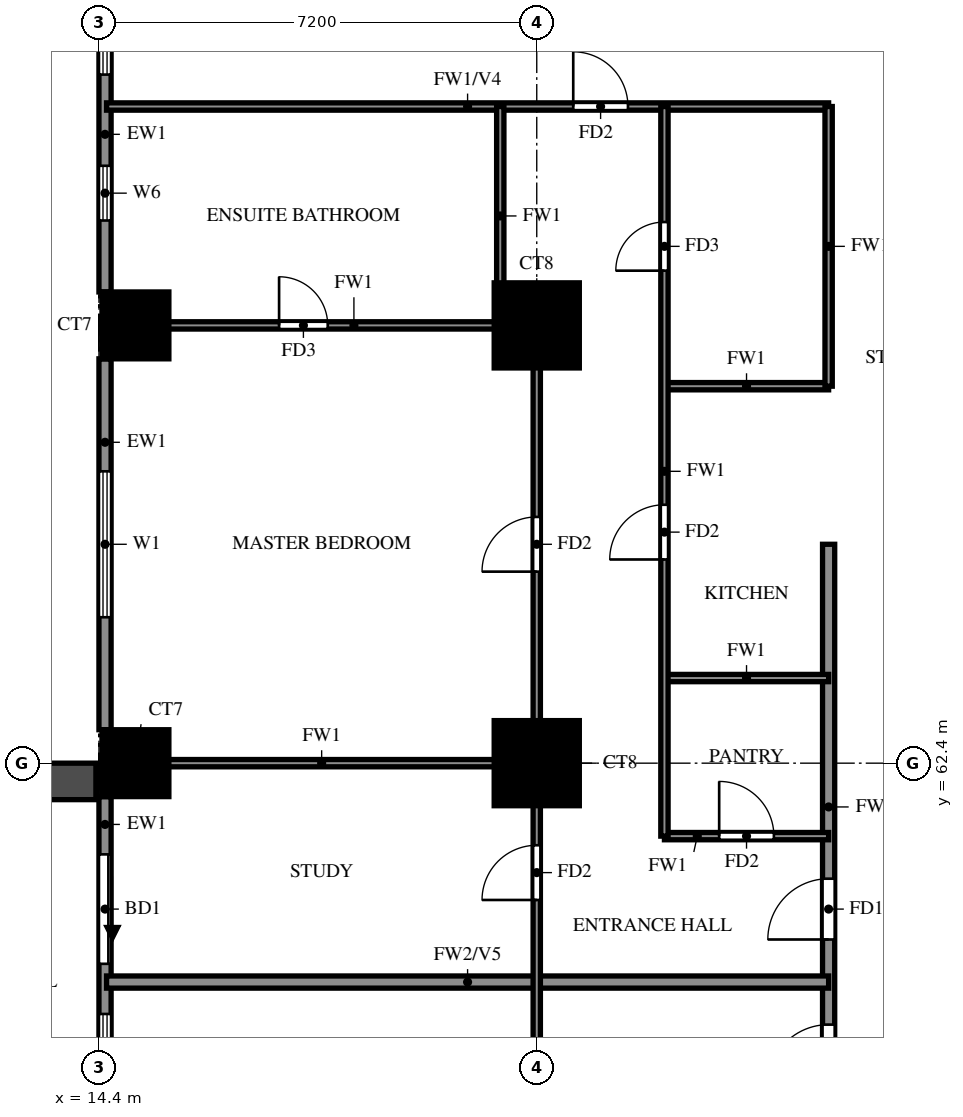
"""IFC4 building model, lengths in metres.
Left out: names, types, materials, properties, quantities, classifications, styles, units other than length and angle.
Written with IfcOpenShell. Run it as: python <this file> out.ifc"""

import sys

from ifc_helpers import new_model, si_unit, direction, frame, frame_2d, origin, origin_2d, place, context, subcontext, project, spatial, rectangle, extrude, source, transform, mapped, element, fill, save


model = new_model("IFC4")
c1 = context("Model", 3, precision=1e-05, world=origin(), true_north=direction((0.0, 1.0)))
c2 = subcontext(c1, "Body", "Model", "MODEL_VIEW")
j1 = project(units=[si_unit("LENGTHUNIT", "METRE"), si_unit("PLANEANGLEUNIT", "RADIAN")], contexts=[c1])
p1 = place(None, origin())
s1 = spatial("IfcSite", under=j1, at=p1, CompositionType="ELEMENT")
p2 = place(p1, origin())
s2 = spatial("IfcBuilding", under=s1, at=p2, CompositionType="ELEMENT")
p3 = place(p2, frame((0.0, 0.0, 48.0)))
s3 = spatial("IfcBuildingStorey", under=s2, at=p3, CompositionType="ELEMENT", Elevation=48.0)
m1 = source(origin(), c2, "Body", "SweptSolid", [
    extrude(rectangle(XDim=1.1, YDim=1.1, at=origin_2d()), origin(), (0.0, 0.0, 1.0), 3.18),
])
p4 = place(p3, frame((15.0, 62.4, 0.0), z_axis=(0.0, 0.0, 1.0), x_axis=(1.0, 0.0, 0.0)))
e1 = element("IfcColumn", 1, at=p4, inside=s3, PredefinedType="COLUMN", context=c2, shape_type="MappedRepresentation", body=[
    mapped(m1, transform((0.0, 0.0, 0.0))),
])
m2 = source(origin(), c2, "Body", "SweptSolid", [
    extrude(rectangle(XDim=1.4, YDim=1.4, at=origin_2d()), origin(), (0.0, 0.0, 1.0), 3.18),
])
p5 = place(p3, frame((21.6, 62.4, 0.0), z_axis=(0.0, 0.0, 1.0), x_axis=(1.0, 0.0, 0.0)))
e2 = element("IfcColumn", 2, at=p5, inside=s3, PredefinedType="COLUMN", context=c2, shape_type="MappedRepresentation", body=[
    mapped(m2, transform((0.0, 0.0, 0.0))),
])
p6 = place(p3, frame((15.0, 69.6, 0.0), z_axis=(0.0, 0.0, 1.0), x_axis=(1.0, 0.0, 0.0)))
e3 = element("IfcColumn", 3, at=p6, inside=s3, PredefinedType="COLUMN", context=c2, shape_type="MappedRepresentation", body=[
    mapped(m1, transform((0.0, 0.0, 0.0))),
])
p7 = place(p3, frame((21.6, 69.6, 0.0), z_axis=(0.0, 0.0, 1.0), x_axis=(1.0, 0.0, 0.0)))
e4 = element("IfcColumn", 4, at=p7, inside=s3, PredefinedType="COLUMN", context=c2, shape_type="MappedRepresentation", body=[
    mapped(m2, transform((0.0, 0.0, 0.0))),
])
p8 = place(p3, frame((14.5, 76.25, 0.0), z_axis=(0.0, 0.0, 1.0), x_axis=(0.0, -1.0, 0.0)))
e5 = element("IfcWall", 5, at=p8, inside=s3, PredefinedType="SOLIDWALL", context=c2, shape_type="SweptSolid", body=[
    extrude(rectangle(XDim=6.1, YDim=0.2, at=frame_2d((3.05, 0.0))), origin(), (0.0, 0.0, 1.0), 3.18),
])
p9 = place(p8, frame((4.025, 0.0, 1.5)))
e6 = element("IfcOpeningElement", 6, at=p9, cuts=e5, PredefinedType="OPENING", context=c2, shape_type="SweptSolid", body=[
    extrude(rectangle(XDim=0.9, YDim=0.9, at=frame_2d((0.45, 0.45))), frame((0.0, 0.11, 0.0), z_axis=(0.0, -1.0, 0.0), x_axis=(1.0, 0.0, 0.0)), (0.0, 0.0, 1.0), 0.22),
])
p10 = place(p8, frame((0.725, 0.0, 0.6)))
e7 = element("IfcOpeningElement", 7, at=p10, cuts=e5, PredefinedType="OPENING", context=c2, shape_type="SweptSolid", body=[
    extrude(rectangle(XDim=1.8, YDim=2.4, at=frame_2d((0.9, 1.2))), frame((0.0, 0.11, 0.0), z_axis=(0.0, -1.0, 0.0), x_axis=(1.0, 0.0, 0.0)), (0.0, 0.0, 1.0), 0.22),
])
p11 = place(p3, frame((14.5, 69.05, 0.0), z_axis=(0.0, 0.0, 1.0), x_axis=(0.0, -1.0, 0.0)))
e8 = element("IfcWall", 8, at=p11, inside=s3, PredefinedType="SOLIDWALL", context=c2, shape_type="SweptSolid", body=[
    extrude(rectangle(XDim=6.1, YDim=0.2, at=frame_2d((3.05, 0.0))), origin(), (0.0, 0.0, 1.0), 3.18),
])
p12 = place(p11, frame((1.85, 0.0, 0.6)))
e9 = element("IfcOpeningElement", 9, at=p12, cuts=e8, PredefinedType="OPENING", context=c2, shape_type="SweptSolid", body=[
    extrude(rectangle(XDim=2.4, YDim=2.4, at=frame_2d((1.2, 1.2))), frame((0.0, 0.11, 0.0), z_axis=(0.0, -1.0, 0.0), x_axis=(1.0, 0.0, 0.0)), (0.0, 0.0, 1.0), 0.22),
])
p13 = place(p3, frame((14.5, 61.85, 0.0), z_axis=(0.0, 0.0, 1.0), x_axis=(0.0, -1.0, 0.0)))
e10 = element("IfcWall", 10, at=p13, inside=s3, PredefinedType="SOLIDWALL", context=c2, shape_type="SweptSolid", body=[
    extrude(rectangle(XDim=6.1, YDim=0.2, at=frame_2d((3.05, 0.0))), origin(), (0.0, 0.0, 1.0), 3.18),
])
p14 = place(p13, frame((0.95, 0.0, 0.0)))
e11 = element("IfcOpeningElement", 11, at=p14, cuts=e10, PredefinedType="OPENING", context=c2, shape_type="SweptSolid", body=[
    extrude(rectangle(XDim=1.8, YDim=2.4, at=frame_2d((0.9, 1.2))), frame((0.0, 0.11, 0.0), z_axis=(0.0, -1.0, 0.0), x_axis=(1.0, 0.0, 0.0)), (0.0, 0.0, 1.0), 0.22),
])
p15 = place(p13, frame((3.575, 0.0, 0.6)))
e12 = element("IfcOpeningElement", 12, at=p15, cuts=e10, PredefinedType="OPENING", context=c2, shape_type="SweptSolid", body=[
    extrude(rectangle(XDim=1.8, YDim=2.4, at=frame_2d((0.9, 1.2))), frame((0.0, 0.11, 0.0), z_axis=(0.0, -1.0, 0.0), x_axis=(1.0, 0.0, 0.0)), (0.0, 0.0, 1.0), 0.22),
])
p16 = place(p3, frame((14.35, 62.1, 0.0), z_axis=(0.0, 0.0, 1.0), x_axis=(-1.0, 0.0, 0.0)))
e13 = element("IfcWall", 13, at=p16, inside=s3, PredefinedType="SOLIDWALL", context=c2, shape_type="SweptSolid", body=[
    extrude(rectangle(XDim=2.65, YDim=0.6, at=frame_2d((1.325, 0.0))), origin(), (0.0, 0.0, 1.0), 2.85),
])
p17 = place(p3, frame((26.4, 56.4, 0.0), z_axis=(0.0, 0.0, 1.0), x_axis=(0.0, 1.0, 0.0)))
e14 = element("IfcWall", 14, at=p17, inside=s3, PredefinedType="SOLIDWALL", context=c2, shape_type="SweptSolid", body=[
    extrude(rectangle(XDim=9.6, YDim=0.2, at=frame_2d((4.8, 0.0))), origin(), (0.0, 0.0, 1.0), 3.18),
])
p18 = place(p17, frame((0.7, 0.0, 0.0)))
e15 = element("IfcOpeningElement", 15, at=p18, cuts=e14, PredefinedType="OPENING", context=c2, shape_type="SweptSolid", body=[
    extrude(rectangle(XDim=1.0, YDim=2.1, at=frame_2d((0.5, 1.05))), frame((0.0, 0.11, 0.0), z_axis=(0.0, -1.0, 0.0), x_axis=(1.0, 0.0, 0.0)), (0.0, 0.0, 1.0), 0.22),
])
p19 = place(p17, frame((3.1, 0.0, 0.0)))
e16 = element("IfcOpeningElement", 16, at=p19, cuts=e14, PredefinedType="OPENING", context=c2, shape_type="SweptSolid", body=[
    extrude(rectangle(XDim=1.0, YDim=2.1, at=frame_2d((0.5, 1.05))), frame((0.0, 0.11, 0.0), z_axis=(0.0, -1.0, 0.0), x_axis=(1.0, 0.0, 0.0)), (0.0, 0.0, 1.0), 0.22),
])
p20 = place(p3, frame((14.525, 58.8, 0.0), z_axis=(0.0, 0.0, 1.0), x_axis=(1.0, 0.0, 0.0)))
e17 = element("IfcWall", 17, at=p20, inside=s3, PredefinedType="SOLIDWALL", context=c2, shape_type="SweptSolid", body=[
    extrude(rectangle(XDim=11.875, YDim=0.2, at=frame_2d((5.938, 0.0))), origin(), (0.0, 0.0, 1.0), 2.28),
])
p21 = place(p3, frame((23.7, 61.2, 0.0), z_axis=(0.0, 0.0, 1.0), x_axis=(1.0, 0.0, 0.0)))
e18 = element("IfcWall", 18, at=p21, inside=s3, PredefinedType="PARTITIONING", context=c2, shape_type="SweptSolid", body=[
    extrude(rectangle(XDim=2.7, YDim=0.12, at=frame_2d((1.35, 0.0))), origin(), (0.0, 0.0, 1.0), 3.18),
])
p22 = place(p21, frame((0.9, 0.0, 0.0)))
e19 = element("IfcOpeningElement", 19, at=p22, cuts=e18, PredefinedType="OPENING", context=c2, shape_type="SweptSolid", body=[
    extrude(rectangle(XDim=0.9, YDim=2.1, at=frame_2d((0.45, 1.05))), frame((0.0, 0.07, 0.0), z_axis=(0.0, -1.0, 0.0), x_axis=(1.0, 0.0, 0.0)), (0.0, 0.0, 1.0), 0.14),
])
p23 = place(p3, frame((14.525, 62.4, 0.0), z_axis=(0.0, 0.0, 1.0), x_axis=(1.0, 0.0, 0.0)))
e20 = element("IfcWall", 20, at=p23, inside=s3, PredefinedType="PARTITIONING", context=c2, shape_type="SweptSolid", body=[
    extrude(rectangle(XDim=7.075, YDim=0.12, at=frame_2d((3.538, 0.0))), origin(), (0.0, 0.0, 1.0), 3.18),
])
for number, where, z_axis, x_axis in (
    (21, (23.7, 63.8, 0.0), (0.0, 0.0, 1.0), (1.0, 0.0, 0.0)),
    (22, (23.7, 68.6, 0.0), (0.0, 0.0, 1.0), (1.0, 0.0, 0.0)),
):
    element("IfcWall", number, at=place(p3, frame(where, z_axis=z_axis, x_axis=x_axis)), inside=s3, PredefinedType="PARTITIONING", context=c2, shape_type="SweptSolid", body=[
        extrude(rectangle(XDim=2.7, YDim=0.12, at=frame_2d((1.35, 0.0))), origin(), (0.0, 0.0, 1.0), 3.18),
    ])
p24 = place(p3, frame((14.525, 69.6, 0.0), z_axis=(0.0, 0.0, 1.0), x_axis=(1.0, 0.0, 0.0)))
e23 = element("IfcWall", 23, at=p24, inside=s3, PredefinedType="PARTITIONING", context=c2, shape_type="SweptSolid", body=[
    extrude(rectangle(XDim=7.075, YDim=0.12, at=frame_2d((3.538, 0.0))), origin(), (0.0, 0.0, 1.0), 3.18),
])
p25 = place(p24, frame((2.837, 0.0, 0.0)))
e24 = element("IfcOpeningElement", 24, at=p25, cuts=e23, PredefinedType="OPENING", context=c2, shape_type="SweptSolid", body=[
    extrude(rectangle(XDim=0.8, YDim=2.1, at=frame_2d((0.4, 1.05))), frame((0.0, 0.07, 0.0), z_axis=(0.0, -1.0, 0.0), x_axis=(1.0, 0.0, 0.0)), (0.0, 0.0, 1.0), 0.14),
])
p26 = place(p3, frame((14.525, 73.2, 0.0), z_axis=(0.0, 0.0, 1.0), x_axis=(1.0, 0.0, 0.0)))
e25 = element("IfcWall", 25, at=p26, inside=s3, PredefinedType="PARTITIONING", context=c2, shape_type="SweptSolid", body=[
    extrude(rectangle(XDim=11.875, YDim=0.12, at=frame_2d((5.938, 0.0))), origin(), (0.0, 0.0, 1.0), 2.28),
])
p27 = place(p26, frame((7.675, 0.0, 0.0)))
e26 = element("IfcOpeningElement", 26, at=p27, cuts=e25, PredefinedType="OPENING", context=c2, shape_type="SweptSolid", body=[
    extrude(rectangle(XDim=0.9, YDim=2.1, at=frame_2d((0.45, 1.05))), frame((0.0, 0.07, 0.0), z_axis=(0.0, -1.0, 0.0), x_axis=(1.0, 0.0, 0.0)), (0.0, 0.0, 1.0), 0.14),
])
p28 = place(p3, frame((21.0, 69.6, 0.0), z_axis=(0.0, 0.0, 1.0), x_axis=(0.0, 1.0, 0.0)))
e27 = element("IfcWall", 27, at=p28, inside=s3, PredefinedType="PARTITIONING", context=c2, shape_type="SweptSolid", body=[
    extrude(rectangle(XDim=3.6, YDim=0.12, at=frame_2d((1.8, 0.0))), origin(), (0.0, 0.0, 1.0), 3.18),
])
p29 = place(p3, frame((21.6, 33.725, 0.0), z_axis=(0.0, 0.0, 1.0), x_axis=(0.0, 1.0, 0.0)))
e28 = element("IfcWall", 28, at=p29, inside=s3, PredefinedType="PARTITIONING", context=c2, shape_type="SweptSolid", body=[
    extrude(rectangle(XDim=35.875, YDim=0.12, at=frame_2d((17.938, 0.0))), origin(), (0.0, 0.0, 1.0), 3.18),
])
p30 = place(p29, frame((7.775, 0.0, 0.0)))
e29 = element("IfcOpeningElement", 29, at=p30, cuts=e28, PredefinedType="OPENING", context=c2, shape_type="SweptSolid", body=[
    extrude(rectangle(XDim=0.9, YDim=2.1, at=frame_2d((0.45, 1.05))), frame((0.0, 0.07, 0.0), z_axis=(0.0, -1.0, 0.0), x_axis=(1.0, 0.0, 0.0)), (0.0, 0.0, 1.0), 0.14),
])
p31 = place(p29, frame((15.625, 0.0, 0.0)))
e30 = element("IfcOpeningElement", 30, at=p31, cuts=e28, PredefinedType="OPENING", context=c2, shape_type="SweptSolid", body=[
    extrude(rectangle(XDim=0.9, YDim=2.1, at=frame_2d((0.45, 1.05))), frame((0.0, 0.07, 0.0), z_axis=(0.0, -1.0, 0.0), x_axis=(1.0, 0.0, 0.0)), (0.0, 0.0, 1.0), 0.14),
])
p32 = place(p29, frame((22.225, 0.0, 0.0)))
e31 = element("IfcOpeningElement", 31, at=p32, cuts=e28, PredefinedType="OPENING", context=c2, shape_type="SweptSolid", body=[
    extrude(rectangle(XDim=1.5, YDim=2.1, at=frame_2d((0.75, 1.05))), frame((0.0, 0.07, 0.0), z_axis=(0.0, -1.0, 0.0), x_axis=(1.0, 0.0, 0.0)), (0.0, 0.0, 1.0), 0.14),
])
p33 = place(p29, frame((26.425, 0.0, 0.0)))
e32 = element("IfcOpeningElement", 32, at=p33, cuts=e28, PredefinedType="OPENING", context=c2, shape_type="SweptSolid", body=[
    extrude(rectangle(XDim=0.9, YDim=2.1, at=frame_2d((0.45, 1.05))), frame((0.0, 0.07, 0.0), z_axis=(0.0, -1.0, 0.0), x_axis=(1.0, 0.0, 0.0)), (0.0, 0.0, 1.0), 0.14),
])
p34 = place(p29, frame((31.825, 0.0, 0.0)))
e33 = element("IfcOpeningElement", 33, at=p34, cuts=e28, PredefinedType="OPENING", context=c2, shape_type="SweptSolid", body=[
    extrude(rectangle(XDim=0.9, YDim=2.1, at=frame_2d((0.45, 1.05))), frame((0.0, 0.07, 0.0), z_axis=(0.0, -1.0, 0.0), x_axis=(1.0, 0.0, 0.0)), (0.0, 0.0, 1.0), 0.14),
])
p35 = place(p3, frame((23.7, 61.2, 0.0), z_axis=(0.0, 0.0, 1.0), x_axis=(0.0, 1.0, 0.0)))
e34 = element("IfcWall", 34, at=p35, inside=s3, PredefinedType="PARTITIONING", context=c2, shape_type="SweptSolid", body=[
    extrude(rectangle(XDim=12.0, YDim=0.12, at=frame_2d((6.0, 0.0))), origin(), (0.0, 0.0, 1.0), 3.18),
])
p36 = place(p35, frame((4.55, 0.0, 0.0)))
e35 = element("IfcOpeningElement", 35, at=p36, cuts=e34, PredefinedType="OPENING", context=c2, shape_type="SweptSolid", body=[
    extrude(rectangle(XDim=0.9, YDim=2.1, at=frame_2d((0.45, 1.05))), frame((0.0, 0.07, 0.0), z_axis=(0.0, -1.0, 0.0), x_axis=(1.0, 0.0, 0.0)), (0.0, 0.0, 1.0), 0.14),
])
p37 = place(p35, frame((9.3, 0.0, 0.0)))
e36 = element("IfcOpeningElement", 36, at=p37, cuts=e34, PredefinedType="OPENING", context=c2, shape_type="SweptSolid", body=[
    extrude(rectangle(XDim=0.8, YDim=2.1, at=frame_2d((0.4, 1.05))), frame((0.0, 0.07, 0.0), z_axis=(0.0, -1.0, 0.0), x_axis=(1.0, 0.0, 0.0)), (0.0, 0.0, 1.0), 0.14),
])
p38 = place(p3, frame((26.4, 68.6, 0.0), z_axis=(0.0, 0.0, 1.0), x_axis=(0.0, 1.0, 0.0)))
e37 = element("IfcWall", 37, at=p38, inside=s3, PredefinedType="PARTITIONING", context=c2, shape_type="SweptSolid", body=[
    extrude(rectangle(XDim=4.6, YDim=0.12, at=frame_2d((2.3, 0.0))), origin(), (0.0, 0.0, 1.0), 3.18),
])
p39 = place(p9, origin())
e38 = element("IfcWindow", 38, at=p39, inside=s3, PartitioningType="SINGLE_PANEL", PredefinedType="WINDOW", context=c2, shape_type="SweptSolid", body=[
    extrude(rectangle(XDim=0.9, YDim=0.9, at=frame_2d((0.45, 0.45))), frame((0.0, 0.03, 0.0), z_axis=(0.0, -1.0, 0.0), x_axis=(1.0, 0.0, 0.0)), (0.0, 0.0, 1.0), 0.06),
])
fill(e6, e38)
p40 = place(p10, origin())
e39 = element("IfcWindow", 39, at=p40, inside=s3, PartitioningType="DOUBLE_PANEL_VERTICAL", PredefinedType="WINDOW", context=c2, shape_type="SweptSolid", body=[
    extrude(rectangle(XDim=1.8, YDim=2.4, at=frame_2d((0.9, 1.2))), frame((0.0, 0.03, 0.0), z_axis=(0.0, -1.0, 0.0), x_axis=(1.0, 0.0, 0.0)), (0.0, 0.0, 1.0), 0.06),
])
fill(e7, e39)
p41 = place(p12, origin())
e40 = element("IfcWindow", 40, at=p41, inside=s3, PartitioningType="DOUBLE_PANEL_VERTICAL", PredefinedType="WINDOW", context=c2, shape_type="SweptSolid", body=[
    extrude(rectangle(XDim=2.4, YDim=2.4, at=frame_2d((1.2, 1.2))), frame((0.0, 0.03, 0.0), z_axis=(0.0, -1.0, 0.0), x_axis=(1.0, 0.0, 0.0)), (0.0, 0.0, 1.0), 0.06),
])
fill(e9, e40)
p42 = place(p14, origin())
e41 = element("IfcDoor", 41, at=p42, inside=s3, OperationType="DOUBLE_DOOR_SLIDING", PredefinedType="DOOR", context=c2, shape_type="SweptSolid", body=[
    extrude(rectangle(XDim=1.8, YDim=2.4, at=frame_2d((0.9, 1.2))), frame((0.0, 0.025, 0.0), z_axis=(0.0, -1.0, 0.0), x_axis=(1.0, 0.0, 0.0)), (0.0, 0.0, 1.0), 0.05),
])
fill(e11, e41)
p43 = place(p15, origin())
e42 = element("IfcWindow", 42, at=p43, inside=s3, PartitioningType="DOUBLE_PANEL_VERTICAL", PredefinedType="WINDOW", context=c2, shape_type="SweptSolid", body=[
    extrude(rectangle(XDim=1.8, YDim=2.4, at=frame_2d((0.9, 1.2))), frame((0.0, 0.03, 0.0), z_axis=(0.0, -1.0, 0.0), x_axis=(1.0, 0.0, 0.0)), (0.0, 0.0, 1.0), 0.06),
])
fill(e12, e42)
p44 = place(p18, origin())
e43 = element("IfcDoor", 43, at=p44, inside=s3, OperationType="SINGLE_SWING_LEFT", PredefinedType="DOOR", context=c2, shape_type="SweptSolid", body=[
    extrude(rectangle(XDim=1.0, YDim=2.1, at=frame_2d((0.5, 1.05))), frame((0.0, 0.025, 0.0), z_axis=(0.0, -1.0, 0.0), x_axis=(1.0, 0.0, 0.0)), (0.0, 0.0, 1.0), 0.05),
])
fill(e15, e43)
p45 = place(p19, origin())
e44 = element("IfcDoor", 44, at=p45, inside=s3, OperationType="SINGLE_SWING_LEFT", PredefinedType="DOOR", context=c2, shape_type="SweptSolid", body=[
    extrude(rectangle(XDim=1.0, YDim=2.1, at=frame_2d((0.5, 1.05))), frame((0.0, 0.025, 0.0), z_axis=(0.0, -1.0, 0.0), x_axis=(1.0, 0.0, 0.0)), (0.0, 0.0, 1.0), 0.05),
])
fill(e16, e44)
p46 = place(p33, origin())
e45 = element("IfcDoor", 45, at=p46, inside=s3, OperationType="SINGLE_SWING_LEFT", PredefinedType="DOOR", context=c2, shape_type="SweptSolid", body=[
    extrude(rectangle(XDim=0.9, YDim=2.1, at=frame_2d((0.45, 1.05))), frame((0.0, 0.025, 0.0), z_axis=(0.0, -1.0, 0.0), x_axis=(1.0, 0.0, 0.0)), (0.0, 0.0, 1.0), 0.05),
])
fill(e32, e45)
p47 = place(p34, origin())
e46 = element("IfcDoor", 46, at=p47, inside=s3, OperationType="SINGLE_SWING_RIGHT", PredefinedType="DOOR", context=c2, shape_type="SweptSolid", body=[
    extrude(rectangle(XDim=0.9, YDim=2.1, at=frame_2d((0.45, 1.05))), frame((0.0, 0.025, 0.0), z_axis=(0.0, -1.0, 0.0), x_axis=(1.0, 0.0, 0.0)), (0.0, 0.0, 1.0), 0.05),
])
fill(e33, e46)
p48 = place(p25, origin())
e47 = element("IfcDoor", 47, at=p48, inside=s3, OperationType="SINGLE_SWING_LEFT", PredefinedType="DOOR", context=c2, shape_type="SweptSolid", body=[
    extrude(rectangle(XDim=0.8, YDim=2.1, at=frame_2d((0.4, 1.05))), frame((0.0, 0.025, 0.0), z_axis=(0.0, -1.0, 0.0), x_axis=(1.0, 0.0, 0.0)), (0.0, 0.0, 1.0), 0.05),
])
fill(e24, e47)
p49 = place(p27, origin())
e48 = element("IfcDoor", 48, at=p49, inside=s3, OperationType="SINGLE_SWING_LEFT", PredefinedType="DOOR", context=c2, shape_type="SweptSolid", body=[
    extrude(rectangle(XDim=0.9, YDim=2.1, at=frame_2d((0.45, 1.05))), frame((0.0, 0.025, 0.0), z_axis=(0.0, -1.0, 0.0), x_axis=(1.0, 0.0, 0.0)), (0.0, 0.0, 1.0), 0.05),
])
fill(e26, e48)
p50 = place(p22, origin())
e49 = element("IfcDoor", 49, at=p50, inside=s3, OperationType="SINGLE_SWING_RIGHT", PredefinedType="DOOR", context=c2, shape_type="SweptSolid", body=[
    extrude(rectangle(XDim=0.9, YDim=2.1, at=frame_2d((0.45, 1.05))), frame((0.0, 0.025, 0.0), z_axis=(0.0, -1.0, 0.0), x_axis=(1.0, 0.0, 0.0)), (0.0, 0.0, 1.0), 0.05),
])
fill(e19, e49)
p51 = place(p36, origin())
e50 = element("IfcDoor", 50, at=p51, inside=s3, OperationType="SINGLE_SWING_LEFT", PredefinedType="DOOR", context=c2, shape_type="SweptSolid", body=[
    extrude(rectangle(XDim=0.9, YDim=2.1, at=frame_2d((0.45, 1.05))), frame((0.0, 0.025, 0.0), z_axis=(0.0, -1.0, 0.0), x_axis=(1.0, 0.0, 0.0)), (0.0, 0.0, 1.0), 0.05),
])
fill(e35, e50)
p52 = place(p37, origin())
e51 = element("IfcDoor", 51, at=p52, inside=s3, OperationType="SINGLE_SWING_LEFT", PredefinedType="DOOR", context=c2, shape_type="SweptSolid", body=[
    extrude(rectangle(XDim=0.8, YDim=2.1, at=frame_2d((0.4, 1.05))), frame((0.0, 0.025, 0.0), z_axis=(0.0, -1.0, 0.0), x_axis=(1.0, 0.0, 0.0)), (0.0, 0.0, 1.0), 0.05),
])
fill(e36, e51)
save(model, sys.argv[1])
